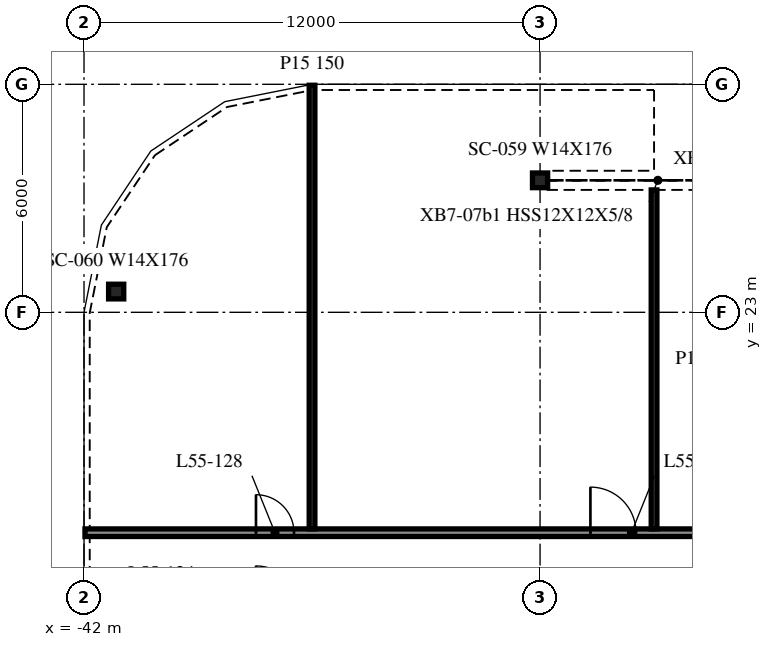
"""IFC4 building model, lengths in metres.
Left out: names, types, materials, properties, quantities, classifications, styles, units other than length and angle.
Written with IfcOpenShell. Run it as: python <this file> out.ifc"""

import sys

from ifc_helpers import new_model, si_unit, direction, frame, frame_2d, origin, origin_2d, place, context, subcontext, project, spatial, rectangle, i_section, extrude, element, fill, save


model = new_model("IFC4")
c1 = context("Model", 3, precision=1e-05, world=origin(), true_north=direction((0.0, 1.0)))
c2 = subcontext(c1, "Body", "Model", "MODEL_VIEW")
j1 = project(units=[si_unit("LENGTHUNIT", "METRE"), si_unit("PLANEANGLEUNIT", "RADIAN")], contexts=[c1])
p1 = place(None, origin())
s1 = spatial("IfcSite", under=j1, at=p1, CompositionType="ELEMENT")
p2 = place(p1, origin())
s2 = spatial("IfcBuilding", under=s1, at=p2, CompositionType="ELEMENT")
p3 = place(p2, frame((0.0, 0.0, 228.6)))
s3 = spatial("IfcBuildingStorey", under=s2, at=p3, CompositionType="ELEMENT", Elevation=228.6)
for number, where, z_axis, x_axis in (
    (1, (-30.0, 26.473, -0.34), (0.0, 0.0, 1.0), (1.0, 0.0, 0.0)),
    (2, (-41.154, 23.546, -0.34), (0.0, 0.0, 1.0), (1.0, 0.0, 0.0)),
):
    element("IfcColumn", number, at=place(p3, frame(where, z_axis=z_axis, x_axis=x_axis)), inside=s3, PredefinedType="COLUMN", context=c2, shape_type="SweptSolid", body=[
        extrude(i_section(OverallWidth=0.399, OverallDepth=0.386, WebThickness=0.021, FlangeThickness=0.033, at=origin_2d()), origin(), (0.0, 0.0, 1.0), 3.8),
    ])
p4 = place(p3, frame((-41.975, 17.2, 0.0), z_axis=(0.0, 0.0, 1.0), x_axis=(1.0, 0.0, 0.0)))
e3 = element("IfcWall", 3, at=p4, inside=s3, PredefinedType="PARTITIONING", context=c2, shape_type="SweptSolid", body=[
    extrude(rectangle(XDim=95.95, YDim=0.2, at=frame_2d((47.975, 0.0))), origin(), (0.0, 0.0, 1.0), 3.46),
])
p5 = place(p4, frame((4.5, 0.0, 0.0)))
e4 = element("IfcOpeningElement", 4, at=p5, cuts=e3, PredefinedType="OPENING", context=c2, shape_type="SweptSolid", body=[
    extrude(rectangle(XDim=1.0, YDim=2.1, at=frame_2d((0.5, 1.05))), frame((0.0, 0.11, 0.0), z_axis=(0.0, -1.0, 0.0), x_axis=(1.0, 0.0, 0.0)), (0.0, 0.0, 1.0), 0.22),
])
p6 = place(p4, frame((13.3, 0.0, 0.0)))
e5 = element("IfcOpeningElement", 5, at=p6, cuts=e3, PredefinedType="OPENING", context=c2, shape_type="SweptSolid", body=[
    extrude(rectangle(XDim=1.2, YDim=2.1, at=frame_2d((0.6, 1.05))), frame((0.0, 0.11, 0.0), z_axis=(0.0, -1.0, 0.0), x_axis=(1.0, 0.0, 0.0)), (0.0, 0.0, 1.0), 0.22),
])
p7 = place(p4, frame((16.3, 0.0, 0.0)))
e6 = element("IfcOpeningElement", 6, at=p7, cuts=e3, PredefinedType="OPENING", context=c2, shape_type="SweptSolid", body=[
    extrude(rectangle(XDim=1.2, YDim=2.1, at=frame_2d((0.6, 1.05))), frame((0.0, 0.11, 0.0), z_axis=(0.0, -1.0, 0.0), x_axis=(1.0, 0.0, 0.0)), (0.0, 0.0, 1.0), 0.22),
])
p8 = place(p4, frame((22.5, 0.0, 0.0)))
e7 = element("IfcOpeningElement", 7, at=p8, cuts=e3, PredefinedType="OPENING", context=c2, shape_type="SweptSolid", body=[
    extrude(rectangle(XDim=1.0, YDim=2.1, at=frame_2d((0.5, 1.05))), frame((0.0, 0.11, 0.0), z_axis=(0.0, -1.0, 0.0), x_axis=(1.0, 0.0, 0.0)), (0.0, 0.0, 1.0), 0.22),
])
p9 = place(p4, frame((25.3, 0.0, 0.0)))
e8 = element("IfcOpeningElement", 8, at=p9, cuts=e3, PredefinedType="OPENING", context=c2, shape_type="SweptSolid", body=[
    extrude(rectangle(XDim=1.2, YDim=2.1, at=frame_2d((0.6, 1.05))), frame((0.0, 0.11, 0.0), z_axis=(0.0, -1.0, 0.0), x_axis=(1.0, 0.0, 0.0)), (0.0, 0.0, 1.0), 0.22),
])
p10 = place(p4, frame((34.3, 0.0, 0.0)))
e9 = element("IfcOpeningElement", 9, at=p10, cuts=e3, PredefinedType="OPENING", context=c2, shape_type="SweptSolid", body=[
    extrude(rectangle(XDim=1.2, YDim=2.1, at=frame_2d((0.6, 1.05))), frame((0.0, 0.11, 0.0), z_axis=(0.0, -1.0, 0.0), x_axis=(1.0, 0.0, 0.0)), (0.0, 0.0, 1.0), 0.22),
])
p11 = place(p4, frame((42.7, 0.0, 0.0)))
e10 = element("IfcOpeningElement", 10, at=p11, cuts=e3, PredefinedType="OPENING", context=c2, shape_type="SweptSolid", body=[
    extrude(rectangle(XDim=1.0, YDim=2.1, at=frame_2d((0.5, 1.05))), frame((0.0, 0.11, 0.0), z_axis=(0.0, -1.0, 0.0), x_axis=(1.0, 0.0, 0.0)), (0.0, 0.0, 1.0), 0.22),
])
p12 = place(p4, frame((47.3, 0.0, 0.0)))
e11 = element("IfcOpeningElement", 11, at=p12, cuts=e3, PredefinedType="OPENING", context=c2, shape_type="SweptSolid", body=[
    extrude(rectangle(XDim=1.2, YDim=2.1, at=frame_2d((0.6, 1.05))), frame((0.0, 0.11, 0.0), z_axis=(0.0, -1.0, 0.0), x_axis=(1.0, 0.0, 0.0)), (0.0, 0.0, 1.0), 0.22),
])
p13 = place(p4, frame((51.1, 0.0, 0.0)))
e12 = element("IfcOpeningElement", 12, at=p13, cuts=e3, PredefinedType="OPENING", context=c2, shape_type="SweptSolid", body=[
    extrude(rectangle(XDim=1.2, YDim=2.1, at=frame_2d((0.6, 1.05))), frame((0.0, 0.11, 0.0), z_axis=(0.0, -1.0, 0.0), x_axis=(1.0, 0.0, 0.0)), (0.0, 0.0, 1.0), 0.22),
])
p14 = place(p4, frame((54.1, 0.0, 0.0)))
e13 = element("IfcOpeningElement", 13, at=p14, cuts=e3, PredefinedType="OPENING", context=c2, shape_type="SweptSolid", body=[
    extrude(rectangle(XDim=1.0, YDim=2.1, at=frame_2d((0.5, 1.05))), frame((0.0, 0.11, 0.0), z_axis=(0.0, -1.0, 0.0), x_axis=(1.0, 0.0, 0.0)), (0.0, 0.0, 1.0), 0.22),
])
p15 = place(p4, frame((60.1, 0.0, 0.0)))
e14 = element("IfcOpeningElement", 14, at=p15, cuts=e3, PredefinedType="OPENING", context=c2, shape_type="SweptSolid", body=[
    extrude(rectangle(XDim=1.2, YDim=2.1, at=frame_2d((0.6, 1.05))), frame((0.0, 0.11, 0.0), z_axis=(0.0, -1.0, 0.0), x_axis=(1.0, 0.0, 0.0)), (0.0, 0.0, 1.0), 0.22),
])
p16 = place(p4, frame((63.1, 0.0, 0.0)))
e15 = element("IfcOpeningElement", 15, at=p16, cuts=e3, PredefinedType="OPENING", context=c2, shape_type="SweptSolid", body=[
    extrude(rectangle(XDim=1.2, YDim=2.1, at=frame_2d((0.6, 1.05))), frame((0.0, 0.11, 0.0), z_axis=(0.0, -1.0, 0.0), x_axis=(1.0, 0.0, 0.0)), (0.0, 0.0, 1.0), 0.22),
])
p17 = place(p4, frame((72.1, 0.0, 0.0)))
e16 = element("IfcOpeningElement", 16, at=p17, cuts=e3, PredefinedType="OPENING", context=c2, shape_type="SweptSolid", body=[
    extrude(rectangle(XDim=1.0, YDim=2.1, at=frame_2d((0.5, 1.05))), frame((0.0, 0.11, 0.0), z_axis=(0.0, -1.0, 0.0), x_axis=(1.0, 0.0, 0.0)), (0.0, 0.0, 1.0), 0.22),
])
p18 = place(p4, frame((78.1, 0.0, 0.0)))
e17 = element("IfcOpeningElement", 17, at=p18, cuts=e3, PredefinedType="OPENING", context=c2, shape_type="SweptSolid", body=[
    extrude(rectangle(XDim=1.2, YDim=2.1, at=frame_2d((0.6, 1.05))), frame((0.0, 0.11, 0.0), z_axis=(0.0, -1.0, 0.0), x_axis=(1.0, 0.0, 0.0)), (0.0, 0.0, 1.0), 0.22),
])
p19 = place(p4, frame((87.1, 0.0, 0.0)))
e18 = element("IfcOpeningElement", 18, at=p19, cuts=e3, PredefinedType="OPENING", context=c2, shape_type="SweptSolid", body=[
    extrude(rectangle(XDim=1.2, YDim=2.1, at=frame_2d((0.6, 1.05))), frame((0.0, 0.11, 0.0), z_axis=(0.0, -1.0, 0.0), x_axis=(1.0, 0.0, 0.0)), (0.0, 0.0, 1.0), 0.22),
])
p20 = place(p4, frame((90.1, 0.0, 0.0)))
e19 = element("IfcOpeningElement", 19, at=p20, cuts=e3, PredefinedType="OPENING", context=c2, shape_type="SweptSolid", body=[
    extrude(rectangle(XDim=1.0, YDim=2.1, at=frame_2d((0.5, 1.05))), frame((0.0, 0.11, 0.0), z_axis=(0.0, -1.0, 0.0), x_axis=(1.0, 0.0, 0.0)), (0.0, 0.0, 1.0), 0.22),
])
p21 = place(p3, frame((-36.0, 17.3, 0.0), z_axis=(0.0, 0.0, 1.0), x_axis=(0.0, 1.0, 0.0)))
e20 = element("IfcWall", 20, at=p21, inside=s3, PredefinedType="PARTITIONING", context=c2, shape_type="SweptSolid", body=[
    extrude(rectangle(XDim=11.675, YDim=0.15, at=frame_2d((5.837, 0.0))), origin(), (0.0, 0.0, 1.0), 3.46),
])
p22 = place(p3, frame((-27.0, 17.3, 0.0), z_axis=(0.0, 0.0, 1.0), x_axis=(0.0, 1.0, 0.0)))
e21 = element("IfcWall", 21, at=p22, inside=s3, PredefinedType="PARTITIONING", context=c2, shape_type="SweptSolid", body=[
    extrude(rectangle(XDim=8.921, YDim=0.15, at=frame_2d((4.46, 0.0))), origin(), (0.0, 0.0, 1.0), 3.46),
])
p23 = place(p5, origin())
e22 = element("IfcDoor", 22, at=p23, inside=s3, OperationType="SINGLE_SWING_LEFT", PredefinedType="DOOR", context=c2, shape_type="SweptSolid", body=[
    extrude(rectangle(XDim=1.0, YDim=2.1, at=frame_2d((0.5, 1.05))), frame((0.0, 0.025, 0.0), z_axis=(0.0, -1.0, 0.0), x_axis=(1.0, 0.0, 0.0)), (0.0, 0.0, 1.0), 0.05),
])
fill(e4, e22)
p24 = place(p6, origin())
e23 = element("IfcDoor", 23, at=p24, inside=s3, OperationType="SINGLE_SWING_LEFT", PredefinedType="DOOR", context=c2, shape_type="SweptSolid", body=[
    extrude(rectangle(XDim=1.2, YDim=2.1, at=frame_2d((0.6, 1.05))), frame((0.0, 0.025, 0.0), z_axis=(0.0, -1.0, 0.0), x_axis=(1.0, 0.0, 0.0)), (0.0, 0.0, 1.0), 0.05),
])
fill(e5, e23)
save(model, sys.argv[1])
